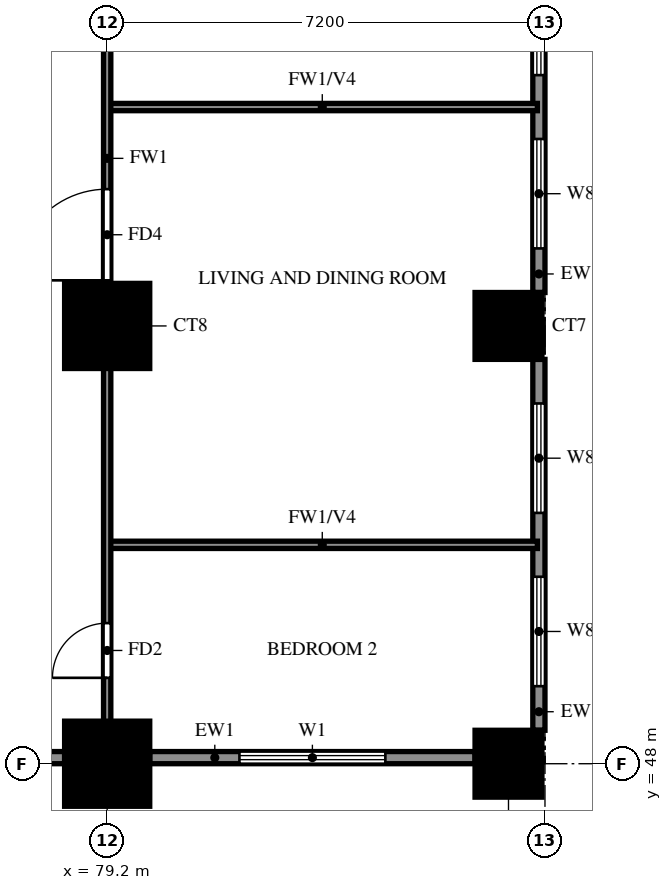
"""IFC4 building model, lengths in metres.
Left out: names, types, materials, properties, quantities, classifications, styles, units other than length and angle.
Written with IfcOpenShell. Run it as: python <this file> out.ifc"""

import sys

from ifc_helpers import new_model, si_unit, direction, frame, frame_2d, origin, origin_2d, place, context, subcontext, project, spatial, rectangle, extrude, source, transform, mapped, element, fill, save


model = new_model("IFC4")
c1 = context("Model", 3, precision=1e-05, world=origin(), true_north=direction((0.0, 1.0)))
c2 = subcontext(c1, "Body", "Model", "MODEL_VIEW")
j1 = project(units=[si_unit("LENGTHUNIT", "METRE"), si_unit("PLANEANGLEUNIT", "RADIAN")], contexts=[c1])
p1 = place(None, origin())
s1 = spatial("IfcSite", under=j1, at=p1, CompositionType="ELEMENT")
p2 = place(p1, origin())
s2 = spatial("IfcBuilding", under=s1, at=p2, CompositionType="ELEMENT")
p3 = place(p2, frame((0.0, 0.0, 41.0)))
s3 = spatial("IfcBuildingStorey", under=s2, at=p3, CompositionType="ELEMENT", Elevation=41.0)
m1 = source(origin(), c2, "Body", "SweptSolid", [
    extrude(rectangle(XDim=1.4, YDim=1.4, at=origin_2d()), origin(), (0.0, 0.0, 1.0), 3.18),
])
p4 = place(p3, frame((79.2, 48.0, 0.0), z_axis=(0.0, 0.0, 1.0), x_axis=(1.0, 0.0, 0.0)))
e1 = element("IfcColumn", 1, at=p4, inside=s3, PredefinedType="COLUMN", context=c2, shape_type="MappedRepresentation", body=[
    mapped(m1, transform((0.0, 0.0, 0.0))),
])
m2 = source(origin(), c2, "Body", "SweptSolid", [
    extrude(rectangle(XDim=1.1, YDim=1.1, at=origin_2d()), origin(), (0.0, 0.0, 1.0), 3.18),
])
p5 = place(p3, frame((85.8, 48.0, 0.0), z_axis=(0.0, 0.0, 1.0), x_axis=(1.0, 0.0, 0.0)))
e2 = element("IfcColumn", 2, at=p5, inside=s3, PredefinedType="COLUMN", context=c2, shape_type="MappedRepresentation", body=[
    mapped(m2, transform((0.0, 0.0, 0.0))),
])
p6 = place(p3, frame((79.2, 55.2, 0.0), z_axis=(0.0, 0.0, 1.0), x_axis=(1.0, 0.0, 0.0)))
e3 = element("IfcColumn", 3, at=p6, inside=s3, PredefinedType="COLUMN", context=c2, shape_type="MappedRepresentation", body=[
    mapped(m1, transform((0.0, 0.0, 0.0))),
])
p7 = place(p3, frame((85.8, 55.2, 0.0), z_axis=(0.0, 0.0, 1.0), x_axis=(1.0, 0.0, 0.0)))
e4 = element("IfcColumn", 4, at=p7, inside=s3, PredefinedType="COLUMN", context=c2, shape_type="MappedRepresentation", body=[
    mapped(m2, transform((0.0, 0.0, 0.0))),
])
p8 = place(p3, frame((78.74, 41.118, 0.0), z_axis=(0.0, 0.0, 1.0), x_axis=(-0.707106781187, 0.707106781187, 0.0)))
e5 = element("IfcWall", 5, at=p8, inside=s3, PredefinedType="SOLIDWALL", context=c2, shape_type="SweptSolid", body=[
    extrude(rectangle(XDim=9.874, YDim=0.2, at=frame_2d((4.937, 0.0))), origin(), (0.0, 0.0, 1.0), 3.18),
])
p9 = place(p3, frame((71.989, 48.1, 0.0), z_axis=(0.0, 0.0, 1.0), x_axis=(1.0, 0.0, 0.0)))
e6 = element("IfcWall", 6, at=p9, inside=s3, PredefinedType="SOLIDWALL", context=c2, shape_type="SweptSolid", body=[
    extrude(rectangle(XDim=6.511, YDim=0.2, at=frame_2d((3.256, 0.0))), origin(), (0.0, 0.0, 1.0), 3.18),
])
p10 = place(p9, frame((2.206, 0.0, 1.5)))
e7 = element("IfcOpeningElement", 7, at=p10, cuts=e6, PredefinedType="OPENING", context=c2, shape_type="SweptSolid", body=[
    extrude(rectangle(XDim=0.9, YDim=0.9, at=frame_2d((0.45, 0.45))), frame((0.0, 0.11, 0.0), z_axis=(0.0, -1.0, 0.0), x_axis=(1.0, 0.0, 0.0)), (0.0, 0.0, 1.0), 0.22),
])
p11 = place(p3, frame((79.9, 48.1, 0.0), z_axis=(0.0, 0.0, 1.0), x_axis=(1.0, 0.0, 0.0)))
e8 = element("IfcWall", 8, at=p11, inside=s3, PredefinedType="SOLIDWALL", context=c2, shape_type="SweptSolid", body=[
    extrude(rectangle(XDim=5.35, YDim=0.2, at=frame_2d((2.675, 0.0))), origin(), (0.0, 0.0, 1.0), 3.18),
])
p12 = place(p11, frame((1.475, 0.0, 0.6)))
e9 = element("IfcOpeningElement", 9, at=p12, cuts=e8, PredefinedType="OPENING", context=c2, shape_type="SweptSolid", body=[
    extrude(rectangle(XDim=2.4, YDim=2.4, at=frame_2d((1.2, 1.2))), frame((0.0, 0.11, 0.0), z_axis=(0.0, -1.0, 0.0), x_axis=(1.0, 0.0, 0.0)), (0.0, 0.0, 1.0), 0.22),
])
p13 = place(p3, frame((86.3, 48.55, 0.0), z_axis=(0.0, 0.0, 1.0), x_axis=(0.0, 1.0, 0.0)))
e10 = element("IfcWall", 10, at=p13, inside=s3, PredefinedType="SOLIDWALL", context=c2, shape_type="SweptSolid", body=[
    extrude(rectangle(XDim=6.1, YDim=0.2, at=frame_2d((3.05, 0.0))), origin(), (0.0, 0.0, 1.0), 3.18),
])
p14 = place(p13, frame((0.725, 0.0, 0.6)))
e11 = element("IfcOpeningElement", 11, at=p14, cuts=e10, PredefinedType="OPENING", context=c2, shape_type="SweptSolid", body=[
    extrude(rectangle(XDim=1.8, YDim=2.4, at=frame_2d((0.9, 1.2))), frame((0.0, 0.11, 0.0), z_axis=(0.0, -1.0, 0.0), x_axis=(1.0, 0.0, 0.0)), (0.0, 0.0, 1.0), 0.22),
])
p15 = place(p13, frame((3.575, 0.0, 0.6)))
e12 = element("IfcOpeningElement", 12, at=p15, cuts=e10, PredefinedType="OPENING", context=c2, shape_type="SweptSolid", body=[
    extrude(rectangle(XDim=1.8, YDim=2.4, at=frame_2d((0.9, 1.2))), frame((0.0, 0.11, 0.0), z_axis=(0.0, -1.0, 0.0), x_axis=(1.0, 0.0, 0.0)), (0.0, 0.0, 1.0), 0.22),
])
p16 = place(p3, frame((86.3, 55.75, 0.0), z_axis=(0.0, 0.0, 1.0), x_axis=(0.0, 1.0, 0.0)))
e13 = element("IfcWall", 13, at=p16, inside=s3, PredefinedType="SOLIDWALL", context=c2, shape_type="SweptSolid", body=[
    extrude(rectangle(XDim=6.1, YDim=0.2, at=frame_2d((3.05, 0.0))), origin(), (0.0, 0.0, 1.0), 3.18),
])
p17 = place(p16, frame((0.725, 0.0, 0.6)))
e14 = element("IfcOpeningElement", 14, at=p17, cuts=e13, PredefinedType="OPENING", context=c2, shape_type="SweptSolid", body=[
    extrude(rectangle(XDim=1.8, YDim=2.4, at=frame_2d((0.9, 1.2))), frame((0.0, 0.11, 0.0), z_axis=(0.0, -1.0, 0.0), x_axis=(1.0, 0.0, 0.0)), (0.0, 0.0, 1.0), 0.22),
])
p18 = place(p16, frame((3.575, 0.0, 0.6)))
e15 = element("IfcOpeningElement", 15, at=p18, cuts=e13, PredefinedType="OPENING", context=c2, shape_type="SweptSolid", body=[
    extrude(rectangle(XDim=1.8, YDim=2.4, at=frame_2d((0.9, 1.2))), frame((0.0, 0.11, 0.0), z_axis=(0.0, -1.0, 0.0), x_axis=(1.0, 0.0, 0.0)), (0.0, 0.0, 1.0), 0.22),
])
for number, where, z_axis, x_axis in (
    (16, (79.2, 51.6, 0.0), (0.0, 0.0, 1.0), (1.0, 0.0, 0.0)),
    (17, (79.2, 58.8, 0.0), (0.0, 0.0, 1.0), (1.0, 0.0, 0.0)),
):
    element("IfcWall", number, at=place(p3, frame(where, z_axis=z_axis, x_axis=x_axis)), inside=s3, PredefinedType="PARTITIONING", context=c2, shape_type="SweptSolid", body=[
        extrude(rectangle(XDim=7.075, YDim=0.12, at=frame_2d((3.538, 0.0))), origin(), (0.0, 0.0, 1.0), 2.28),
    ])
p19 = place(p3, frame((79.2, 48.125, 0.0), z_axis=(0.0, 0.0, 1.0), x_axis=(0.0, 1.0, 0.0)))
e18 = element("IfcWall", 18, at=p19, inside=s3, PredefinedType="PARTITIONING", context=c2, shape_type="SweptSolid", body=[
    extrude(rectangle(XDim=17.875, YDim=0.12, at=frame_2d((8.938, 0.0))), origin(), (0.0, 0.0, 1.0), 3.18),
])
p20 = place(p19, frame((1.288, 0.0, 0.0)))
e19 = element("IfcOpeningElement", 19, at=p20, cuts=e18, PredefinedType="OPENING", context=c2, shape_type="SweptSolid", body=[
    extrude(rectangle(XDim=0.9, YDim=2.1, at=frame_2d((0.45, 1.05))), frame((0.0, 0.07, 0.0), z_axis=(0.0, -1.0, 0.0), x_axis=(1.0, 0.0, 0.0)), (0.0, 0.0, 1.0), 0.14),
])
p21 = place(p19, frame((7.825, 0.0, 0.0)))
e20 = element("IfcOpeningElement", 20, at=p21, cuts=e18, PredefinedType="OPENING", context=c2, shape_type="SweptSolid", body=[
    extrude(rectangle(XDim=1.5, YDim=2.1, at=frame_2d((0.75, 1.05))), frame((0.0, 0.07, 0.0), z_axis=(0.0, -1.0, 0.0), x_axis=(1.0, 0.0, 0.0)), (0.0, 0.0, 1.0), 0.14),
])
p22 = place(p19, frame((12.025, 0.0, 0.0)))
e21 = element("IfcOpeningElement", 21, at=p22, cuts=e18, PredefinedType="OPENING", context=c2, shape_type="SweptSolid", body=[
    extrude(rectangle(XDim=0.9, YDim=2.1, at=frame_2d((0.45, 1.05))), frame((0.0, 0.07, 0.0), z_axis=(0.0, -1.0, 0.0), x_axis=(1.0, 0.0, 0.0)), (0.0, 0.0, 1.0), 0.14),
])
p23 = place(p19, frame((15.625, 0.0, 0.0)))
e22 = element("IfcOpeningElement", 22, at=p23, cuts=e18, PredefinedType="OPENING", context=c2, shape_type="SweptSolid", body=[
    extrude(rectangle(XDim=0.9, YDim=2.1, at=frame_2d((0.45, 1.05))), frame((0.0, 0.07, 0.0), z_axis=(0.0, -1.0, 0.0), x_axis=(1.0, 0.0, 0.0)), (0.0, 0.0, 1.0), 0.14),
])
p24 = place(p12, origin())
e23 = element("IfcWindow", 23, at=p24, inside=s3, PartitioningType="DOUBLE_PANEL_VERTICAL", PredefinedType="WINDOW", context=c2, shape_type="SweptSolid", body=[
    extrude(rectangle(XDim=2.4, YDim=2.4, at=frame_2d((1.2, 1.2))), frame((0.0, 0.03, 0.0), z_axis=(0.0, -1.0, 0.0), x_axis=(1.0, 0.0, 0.0)), (0.0, 0.0, 1.0), 0.06),
])
fill(e9, e23)
p25 = place(p14, origin())
e24 = element("IfcWindow", 24, at=p25, inside=s3, PartitioningType="DOUBLE_PANEL_VERTICAL", PredefinedType="WINDOW", context=c2, shape_type="SweptSolid", body=[
    extrude(rectangle(XDim=1.8, YDim=2.4, at=frame_2d((0.9, 1.2))), frame((0.0, 0.03, 0.0), z_axis=(0.0, -1.0, 0.0), x_axis=(1.0, 0.0, 0.0)), (0.0, 0.0, 1.0), 0.06),
])
fill(e11, e24)
p26 = place(p15, origin())
e25 = element("IfcWindow", 25, at=p26, inside=s3, PartitioningType="DOUBLE_PANEL_VERTICAL", PredefinedType="WINDOW", context=c2, shape_type="SweptSolid", body=[
    extrude(rectangle(XDim=1.8, YDim=2.4, at=frame_2d((0.9, 1.2))), frame((0.0, 0.03, 0.0), z_axis=(0.0, -1.0, 0.0), x_axis=(1.0, 0.0, 0.0)), (0.0, 0.0, 1.0), 0.06),
])
fill(e12, e25)
p27 = place(p17, origin())
e26 = element("IfcWindow", 26, at=p27, inside=s3, PartitioningType="DOUBLE_PANEL_VERTICAL", PredefinedType="WINDOW", context=c2, shape_type="SweptSolid", body=[
    extrude(rectangle(XDim=1.8, YDim=2.4, at=frame_2d((0.9, 1.2))), frame((0.0, 0.03, 0.0), z_axis=(0.0, -1.0, 0.0), x_axis=(1.0, 0.0, 0.0)), (0.0, 0.0, 1.0), 0.06),
])
fill(e14, e26)
p28 = place(p18, origin())
e27 = element("IfcWindow", 27, at=p28, inside=s3, PartitioningType="DOUBLE_PANEL_VERTICAL", PredefinedType="WINDOW", context=c2, shape_type="SweptSolid", body=[
    extrude(rectangle(XDim=1.8, YDim=2.4, at=frame_2d((0.9, 1.2))), frame((0.0, 0.03, 0.0), z_axis=(0.0, -1.0, 0.0), x_axis=(1.0, 0.0, 0.0)), (0.0, 0.0, 1.0), 0.06),
])
fill(e15, e27)
p29 = place(p20, origin())
e28 = element("IfcDoor", 28, at=p29, inside=s3, OperationType="SINGLE_SWING_LEFT", PredefinedType="DOOR", context=c2, shape_type="SweptSolid", body=[
    extrude(rectangle(XDim=0.9, YDim=2.1, at=frame_2d((0.45, 1.05))), frame((0.0, 0.025, 0.0), z_axis=(0.0, -1.0, 0.0), x_axis=(1.0, 0.0, 0.0)), (0.0, 0.0, 1.0), 0.05),
])
fill(e19, e28)
p30 = place(p21, origin())
e29 = element("IfcDoor", 29, at=p30, inside=s3, OperationType="SINGLE_SWING_RIGHT", PredefinedType="DOOR", context=c2, shape_type="SweptSolid", body=[
    extrude(rectangle(XDim=1.5, YDim=2.1, at=frame_2d((0.75, 1.05))), frame((0.0, 0.025, 0.0), z_axis=(0.0, -1.0, 0.0), x_axis=(1.0, 0.0, 0.0)), (0.0, 0.0, 1.0), 0.05),
])
fill(e20, e29)
save(model, sys.argv[1])
